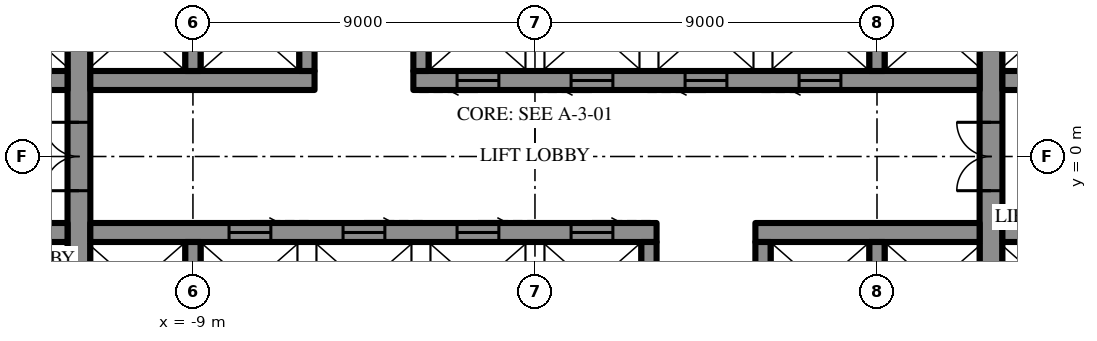
"""IFC4 building model, lengths in metres.
Left out: names, types, materials, properties, quantities, classifications, styles, units other than length and angle.
Written with IfcOpenShell. Run it as: python <this file> out.ifc"""

import sys

from ifc_helpers import new_model, si_unit, direction, frame, frame_2d, origin, place, context, subcontext, project, spatial, rectangle, extrude, element, fill, save


model = new_model("IFC4")
c1 = context("Model", 3, precision=1e-05, world=origin(), true_north=direction((0.0, 1.0)))
c2 = subcontext(c1, "Body", "Model", "MODEL_VIEW")
j1 = project(units=[si_unit("LENGTHUNIT", "METRE"), si_unit("PLANEANGLEUNIT", "RADIAN")], contexts=[c1])
p1 = place(None, origin())
s1 = spatial("IfcSite", under=j1, at=p1, CompositionType="ELEMENT")
p2 = place(p1, origin())
s2 = spatial("IfcBuilding", under=s1, at=p2, CompositionType="ELEMENT")
p3 = place(p2, frame((0.0, 0.0, 78.1)))
s3 = spatial("IfcBuildingStorey", under=s2, at=p3, CompositionType="ELEMENT", Elevation=78.1)
p4 = place(p3, frame((12.0, -10.7, 0.0), z_axis=(0.0, 0.0, 1.0), x_axis=(0.0, 1.0, 0.0)))
e1 = element("IfcWall", 1, at=p4, inside=s3, PredefinedType="SHEAR", context=c2, shape_type="SweptSolid", body=[
    extrude(rectangle(XDim=21.4, YDim=0.6, at=frame_2d((10.7, 0.0))), origin(), (0.0, 0.0, 1.0), 4.2),
])
p5 = place(p4, frame((9.8, 0.0, 0.0)))
e2 = element("IfcOpeningElement", 2, at=p5, cuts=e1, PredefinedType="OPENING", context=c2, shape_type="SweptSolid", body=[
    extrude(rectangle(XDim=1.8, YDim=2.4, at=frame_2d((0.9, 1.2))), frame((0.0, 0.31, 0.0), z_axis=(0.0, -1.0, 0.0), x_axis=(1.0, 0.0, 0.0)), (0.0, 0.0, 1.0), 0.62),
])
p6 = place(p3, frame((-12.0, -10.7, 0.0), z_axis=(0.0, 0.0, 1.0), x_axis=(0.0, 1.0, 0.0)))
e3 = element("IfcWall", 3, at=p6, inside=s3, PredefinedType="SHEAR", context=c2, shape_type="SweptSolid", body=[
    extrude(rectangle(XDim=21.4, YDim=0.6, at=frame_2d((10.7, 0.0))), origin(), (0.0, 0.0, 1.0), 4.2),
])
p7 = place(p6, frame((9.8, 0.0, 0.0)))
e4 = element("IfcOpeningElement", 4, at=p7, cuts=e3, PredefinedType="OPENING", context=c2, shape_type="SweptSolid", body=[
    extrude(rectangle(XDim=1.8, YDim=2.4, at=frame_2d((0.9, 1.2))), frame((0.0, 0.31, 0.0), z_axis=(0.0, -1.0, 0.0), x_axis=(1.0, 0.0, 0.0)), (0.0, 0.0, 1.0), 0.62),
])
p8 = place(p3, frame((-14.8, 2.0, 0.0), z_axis=(0.0, 0.0, 1.0), x_axis=(1.0, 0.0, 0.0)))
e5 = element("IfcWall", 5, at=p8, inside=s3, PredefinedType="SHEAR", context=c2, shape_type="SweptSolid", body=[
    extrude(rectangle(XDim=2.5, YDim=0.5, at=frame_2d((1.25, 0.0))), origin(), (0.0, 0.0, 1.0), 4.2),
])
p9 = place(p3, frame((-11.7, 2.0, 0.0), z_axis=(0.0, 0.0, 1.0), x_axis=(1.0, 0.0, 0.0)))
e6 = element("IfcWall", 6, at=p9, inside=s3, PredefinedType="SHEAR", context=c2, shape_type="SweptSolid", body=[
    extrude(rectangle(XDim=5.9, YDim=0.5, at=frame_2d((2.95, 0.0))), origin(), (0.0, 0.0, 1.0), 4.2),
])
p10 = place(p3, frame((-3.2, 2.0, 0.0), z_axis=(0.0, 0.0, 1.0), x_axis=(1.0, 0.0, 0.0)))
e7 = element("IfcWall", 7, at=p10, inside=s3, PredefinedType="SHEAR", context=c2, shape_type="SweptSolid", body=[
    extrude(rectangle(XDim=14.9, YDim=0.5, at=frame_2d((7.45, 0.0))), origin(), (0.0, 0.0, 1.0), 4.2),
])
p11 = place(p10, frame((1.15, 0.0, 0.0)))
e8 = element("IfcOpeningElement", 8, at=p11, cuts=e7, PredefinedType="OPENING", context=c2, shape_type="SweptSolid", body=[
    extrude(rectangle(XDim=1.1, YDim=2.2, at=frame_2d((0.55, 1.1))), frame((0.0, 0.26, 0.0), z_axis=(0.0, -1.0, 0.0), x_axis=(1.0, 0.0, 0.0)), (0.0, 0.0, 1.0), 0.52),
])
p12 = place(p10, frame((4.15, 0.0, 0.0)))
e9 = element("IfcOpeningElement", 9, at=p12, cuts=e7, PredefinedType="OPENING", context=c2, shape_type="SweptSolid", body=[
    extrude(rectangle(XDim=1.1, YDim=2.2, at=frame_2d((0.55, 1.1))), frame((0.0, 0.26, 0.0), z_axis=(0.0, -1.0, 0.0), x_axis=(1.0, 0.0, 0.0)), (0.0, 0.0, 1.0), 0.52),
])
p13 = place(p10, frame((7.15, 0.0, 0.0)))
e10 = element("IfcOpeningElement", 10, at=p13, cuts=e7, PredefinedType="OPENING", context=c2, shape_type="SweptSolid", body=[
    extrude(rectangle(XDim=1.1, YDim=2.2, at=frame_2d((0.55, 1.1))), frame((0.0, 0.26, 0.0), z_axis=(0.0, -1.0, 0.0), x_axis=(1.0, 0.0, 0.0)), (0.0, 0.0, 1.0), 0.52),
])
p14 = place(p10, frame((10.15, 0.0, 0.0)))
e11 = element("IfcOpeningElement", 11, at=p14, cuts=e7, PredefinedType="OPENING", context=c2, shape_type="SweptSolid", body=[
    extrude(rectangle(XDim=1.1, YDim=2.2, at=frame_2d((0.55, 1.1))), frame((0.0, 0.26, 0.0), z_axis=(0.0, -1.0, 0.0), x_axis=(1.0, 0.0, 0.0)), (0.0, 0.0, 1.0), 0.52),
])
p15 = place(p3, frame((12.3, 2.0, 0.0), z_axis=(0.0, 0.0, 1.0), x_axis=(1.0, 0.0, 0.0)))
e12 = element("IfcWall", 12, at=p15, inside=s3, PredefinedType="SHEAR", context=c2, shape_type="SweptSolid", body=[
    extrude(rectangle(XDim=2.5, YDim=0.5, at=frame_2d((1.25, 0.0))), origin(), (0.0, 0.0, 1.0), 4.2),
])
for number, where, z_axis, x_axis in (
    (13, (-9.0, 2.25, 0.0), (0.0, 0.0, 1.0), (0.0, 1.0, 0.0)),
    (14, (-6.0, 2.25, 0.0), (0.0, 0.0, 1.0), (0.0, 1.0, 0.0)),
    (15, (-3.0, 2.25, 0.0), (0.0, 0.0, 1.0), (0.0, 1.0, 0.0)),
    (16, (9.0, 2.25, 0.0), (0.0, 0.0, 1.0), (0.0, 1.0, 0.0)),
):
    element("IfcWall", number, at=place(p3, frame(where, z_axis=z_axis, x_axis=x_axis)), inside=s3, PredefinedType="SHEAR", context=c2, shape_type="SweptSolid", body=[
        extrude(rectangle(XDim=2.3, YDim=0.4, at=frame_2d((1.15, 0.0))), origin(), (0.0, 0.0, 1.0), 4.2),
    ])
p16 = place(p3, frame((14.8, -2.0, 0.0), z_axis=(0.0, 0.0, 1.0), x_axis=(-1.0, 0.0, 0.0)))
e17 = element("IfcWall", 17, at=p16, inside=s3, PredefinedType="SHEAR", context=c2, shape_type="SweptSolid", body=[
    extrude(rectangle(XDim=2.5, YDim=0.5, at=frame_2d((1.25, 0.0))), origin(), (0.0, 0.0, 1.0), 4.2),
])
p17 = place(p3, frame((11.7, -2.0, 0.0), z_axis=(0.0, 0.0, 1.0), x_axis=(-1.0, 0.0, 0.0)))
e18 = element("IfcWall", 18, at=p17, inside=s3, PredefinedType="SHEAR", context=c2, shape_type="SweptSolid", body=[
    extrude(rectangle(XDim=5.9, YDim=0.5, at=frame_2d((2.95, 0.0))), origin(), (0.0, 0.0, 1.0), 4.2),
])
p18 = place(p3, frame((3.2, -2.0, 0.0), z_axis=(0.0, 0.0, 1.0), x_axis=(-1.0, 0.0, 0.0)))
e19 = element("IfcWall", 19, at=p18, inside=s3, PredefinedType="SHEAR", context=c2, shape_type="SweptSolid", body=[
    extrude(rectangle(XDim=14.9, YDim=0.5, at=frame_2d((7.45, 0.0))), origin(), (0.0, 0.0, 1.0), 4.2),
])
p19 = place(p18, frame((1.15, 0.0, 0.0)))
e20 = element("IfcOpeningElement", 20, at=p19, cuts=e19, PredefinedType="OPENING", context=c2, shape_type="SweptSolid", body=[
    extrude(rectangle(XDim=1.1, YDim=2.2, at=frame_2d((0.55, 1.1))), frame((0.0, 0.26, 0.0), z_axis=(0.0, -1.0, 0.0), x_axis=(1.0, 0.0, 0.0)), (0.0, 0.0, 1.0), 0.52),
])
p20 = place(p18, frame((4.15, 0.0, 0.0)))
e21 = element("IfcOpeningElement", 21, at=p20, cuts=e19, PredefinedType="OPENING", context=c2, shape_type="SweptSolid", body=[
    extrude(rectangle(XDim=1.1, YDim=2.2, at=frame_2d((0.55, 1.1))), frame((0.0, 0.26, 0.0), z_axis=(0.0, -1.0, 0.0), x_axis=(1.0, 0.0, 0.0)), (0.0, 0.0, 1.0), 0.52),
])
p21 = place(p18, frame((7.15, 0.0, 0.0)))
e22 = element("IfcOpeningElement", 22, at=p21, cuts=e19, PredefinedType="OPENING", context=c2, shape_type="SweptSolid", body=[
    extrude(rectangle(XDim=1.1, YDim=2.2, at=frame_2d((0.55, 1.1))), frame((0.0, 0.26, 0.0), z_axis=(0.0, -1.0, 0.0), x_axis=(1.0, 0.0, 0.0)), (0.0, 0.0, 1.0), 0.52),
])
p22 = place(p18, frame((10.15, 0.0, 0.0)))
e23 = element("IfcOpeningElement", 23, at=p22, cuts=e19, PredefinedType="OPENING", context=c2, shape_type="SweptSolid", body=[
    extrude(rectangle(XDim=1.1, YDim=2.2, at=frame_2d((0.55, 1.1))), frame((0.0, 0.26, 0.0), z_axis=(0.0, -1.0, 0.0), x_axis=(1.0, 0.0, 0.0)), (0.0, 0.0, 1.0), 0.52),
])
p23 = place(p3, frame((-12.3, -2.0, 0.0), z_axis=(0.0, 0.0, 1.0), x_axis=(-1.0, 0.0, 0.0)))
e24 = element("IfcWall", 24, at=p23, inside=s3, PredefinedType="SHEAR", context=c2, shape_type="SweptSolid", body=[
    extrude(rectangle(XDim=2.5, YDim=0.5, at=frame_2d((1.25, 0.0))), origin(), (0.0, 0.0, 1.0), 4.2),
])
for number, where, z_axis, x_axis in (
    (25, (9.0, -2.25, 0.0), (0.0, 0.0, 1.0), (0.0, -1.0, 0.0)),
    (26, (6.0, -2.25, 0.0), (0.0, 0.0, 1.0), (0.0, -1.0, 0.0)),
    (27, (3.0, -2.25, 0.0), (0.0, 0.0, 1.0), (0.0, -1.0, 0.0)),
    (28, (-9.0, -2.25, 0.0), (0.0, 0.0, 1.0), (0.0, -1.0, 0.0)),
):
    element("IfcWall", number, at=place(p3, frame(where, z_axis=z_axis, x_axis=x_axis)), inside=s3, PredefinedType="SHEAR", context=c2, shape_type="SweptSolid", body=[
        extrude(rectangle(XDim=2.3, YDim=0.4, at=frame_2d((1.15, 0.0))), origin(), (0.0, 0.0, 1.0), 4.2),
    ])
p24 = place(p5, origin())
e29 = element("IfcDoor", 29, at=p24, inside=s3, OperationType="DOUBLE_DOOR_SINGLE_SWING", PredefinedType="DOOR", context=c2, shape_type="SweptSolid", body=[
    extrude(rectangle(XDim=1.8, YDim=2.4, at=frame_2d((0.9, 1.2))), frame((0.0, 0.025, 0.0), z_axis=(0.0, -1.0, 0.0), x_axis=(1.0, 0.0, 0.0)), (0.0, 0.0, 1.0), 0.05),
])
fill(e2, e29)
p25 = place(p7, origin())
e30 = element("IfcDoor", 30, at=p25, inside=s3, OperationType="DOUBLE_DOOR_SINGLE_SWING", PredefinedType="DOOR", context=c2, shape_type="SweptSolid", body=[
    extrude(rectangle(XDim=1.8, YDim=2.4, at=frame_2d((0.9, 1.2))), frame((0.0, 0.025, 0.0), z_axis=(0.0, -1.0, 0.0), x_axis=(1.0, 0.0, 0.0)), (0.0, 0.0, 1.0), 0.05),
])
fill(e4, e30)
p26 = place(p11, frame((1.1, 0.0, 0.0), z_axis=(0.0, 0.0, 1.0), x_axis=(-1.0, 0.0, 0.0)))
e31 = element("IfcDoor", 31, at=p26, inside=s3, OperationType="SLIDING_TO_LEFT", PredefinedType="DOOR", context=c2, shape_type="SweptSolid", body=[
    extrude(rectangle(XDim=1.1, YDim=2.2, at=frame_2d((0.55, 1.1))), frame((0.0, 0.025, 0.0), z_axis=(0.0, -1.0, 0.0), x_axis=(1.0, 0.0, 0.0)), (0.0, 0.0, 1.0), 0.05),
])
fill(e8, e31)
p27 = place(p12, frame((1.1, 0.0, 0.0), z_axis=(0.0, 0.0, 1.0), x_axis=(-1.0, 0.0, 0.0)))
e32 = element("IfcDoor", 32, at=p27, inside=s3, OperationType="SLIDING_TO_LEFT", PredefinedType="DOOR", context=c2, shape_type="SweptSolid", body=[
    extrude(rectangle(XDim=1.1, YDim=2.2, at=frame_2d((0.55, 1.1))), frame((0.0, 0.025, 0.0), z_axis=(0.0, -1.0, 0.0), x_axis=(1.0, 0.0, 0.0)), (0.0, 0.0, 1.0), 0.05),
])
fill(e9, e32)
p28 = place(p13, frame((1.1, 0.0, 0.0), z_axis=(0.0, 0.0, 1.0), x_axis=(-1.0, 0.0, 0.0)))
e33 = element("IfcDoor", 33, at=p28, inside=s3, OperationType="SLIDING_TO_LEFT", PredefinedType="DOOR", context=c2, shape_type="SweptSolid", body=[
    extrude(rectangle(XDim=1.1, YDim=2.2, at=frame_2d((0.55, 1.1))), frame((0.0, 0.025, 0.0), z_axis=(0.0, -1.0, 0.0), x_axis=(1.0, 0.0, 0.0)), (0.0, 0.0, 1.0), 0.05),
])
fill(e10, e33)
p29 = place(p14, frame((1.1, 0.0, 0.0), z_axis=(0.0, 0.0, 1.0), x_axis=(-1.0, 0.0, 0.0)))
e34 = element("IfcDoor", 34, at=p29, inside=s3, OperationType="SLIDING_TO_LEFT", PredefinedType="DOOR", context=c2, shape_type="SweptSolid", body=[
    extrude(rectangle(XDim=1.1, YDim=2.2, at=frame_2d((0.55, 1.1))), frame((0.0, 0.025, 0.0), z_axis=(0.0, -1.0, 0.0), x_axis=(1.0, 0.0, 0.0)), (0.0, 0.0, 1.0), 0.05),
])
fill(e11, e34)
p30 = place(p19, frame((1.1, 0.0, 0.0), z_axis=(0.0, 0.0, 1.0), x_axis=(-1.0, 0.0, 0.0)))
e35 = element("IfcDoor", 35, at=p30, inside=s3, OperationType="SLIDING_TO_LEFT", PredefinedType="DOOR", context=c2, shape_type="SweptSolid", body=[
    extrude(rectangle(XDim=1.1, YDim=2.2, at=frame_2d((0.55, 1.1))), frame((0.0, 0.025, 0.0), z_axis=(0.0, -1.0, 0.0), x_axis=(1.0, 0.0, 0.0)), (0.0, 0.0, 1.0), 0.05),
])
fill(e20, e35)
p31 = place(p20, frame((1.1, 0.0, 0.0), z_axis=(0.0, 0.0, 1.0), x_axis=(-1.0, 0.0, 0.0)))
e36 = element("IfcDoor", 36, at=p31, inside=s3, OperationType="SLIDING_TO_LEFT", PredefinedType="DOOR", context=c2, shape_type="SweptSolid", body=[
    extrude(rectangle(XDim=1.1, YDim=2.2, at=frame_2d((0.55, 1.1))), frame((0.0, 0.025, 0.0), z_axis=(0.0, -1.0, 0.0), x_axis=(1.0, 0.0, 0.0)), (0.0, 0.0, 1.0), 0.05),
])
fill(e21, e36)
p32 = place(p21, frame((1.1, 0.0, 0.0), z_axis=(0.0, 0.0, 1.0), x_axis=(-1.0, 0.0, 0.0)))
e37 = element("IfcDoor", 37, at=p32, inside=s3, OperationType="SLIDING_TO_LEFT", PredefinedType="DOOR", context=c2, shape_type="SweptSolid", body=[
    extrude(rectangle(XDim=1.1, YDim=2.2, at=frame_2d((0.55, 1.1))), frame((0.0, 0.025, 0.0), z_axis=(0.0, -1.0, 0.0), x_axis=(1.0, 0.0, 0.0)), (0.0, 0.0, 1.0), 0.05),
])
fill(e22, e37)
p33 = place(p22, frame((1.1, 0.0, 0.0), z_axis=(0.0, 0.0, 1.0), x_axis=(-1.0, 0.0, 0.0)))
e38 = element("IfcDoor", 38, at=p33, inside=s3, OperationType="SLIDING_TO_LEFT", PredefinedType="DOOR", context=c2, shape_type="SweptSolid", body=[
    extrude(rectangle(XDim=1.1, YDim=2.2, at=frame_2d((0.55, 1.1))), frame((0.0, 0.025, 0.0), z_axis=(0.0, -1.0, 0.0), x_axis=(1.0, 0.0, 0.0)), (0.0, 0.0, 1.0), 0.05),
])
fill(e23, e38)
save(model, sys.argv[1])
